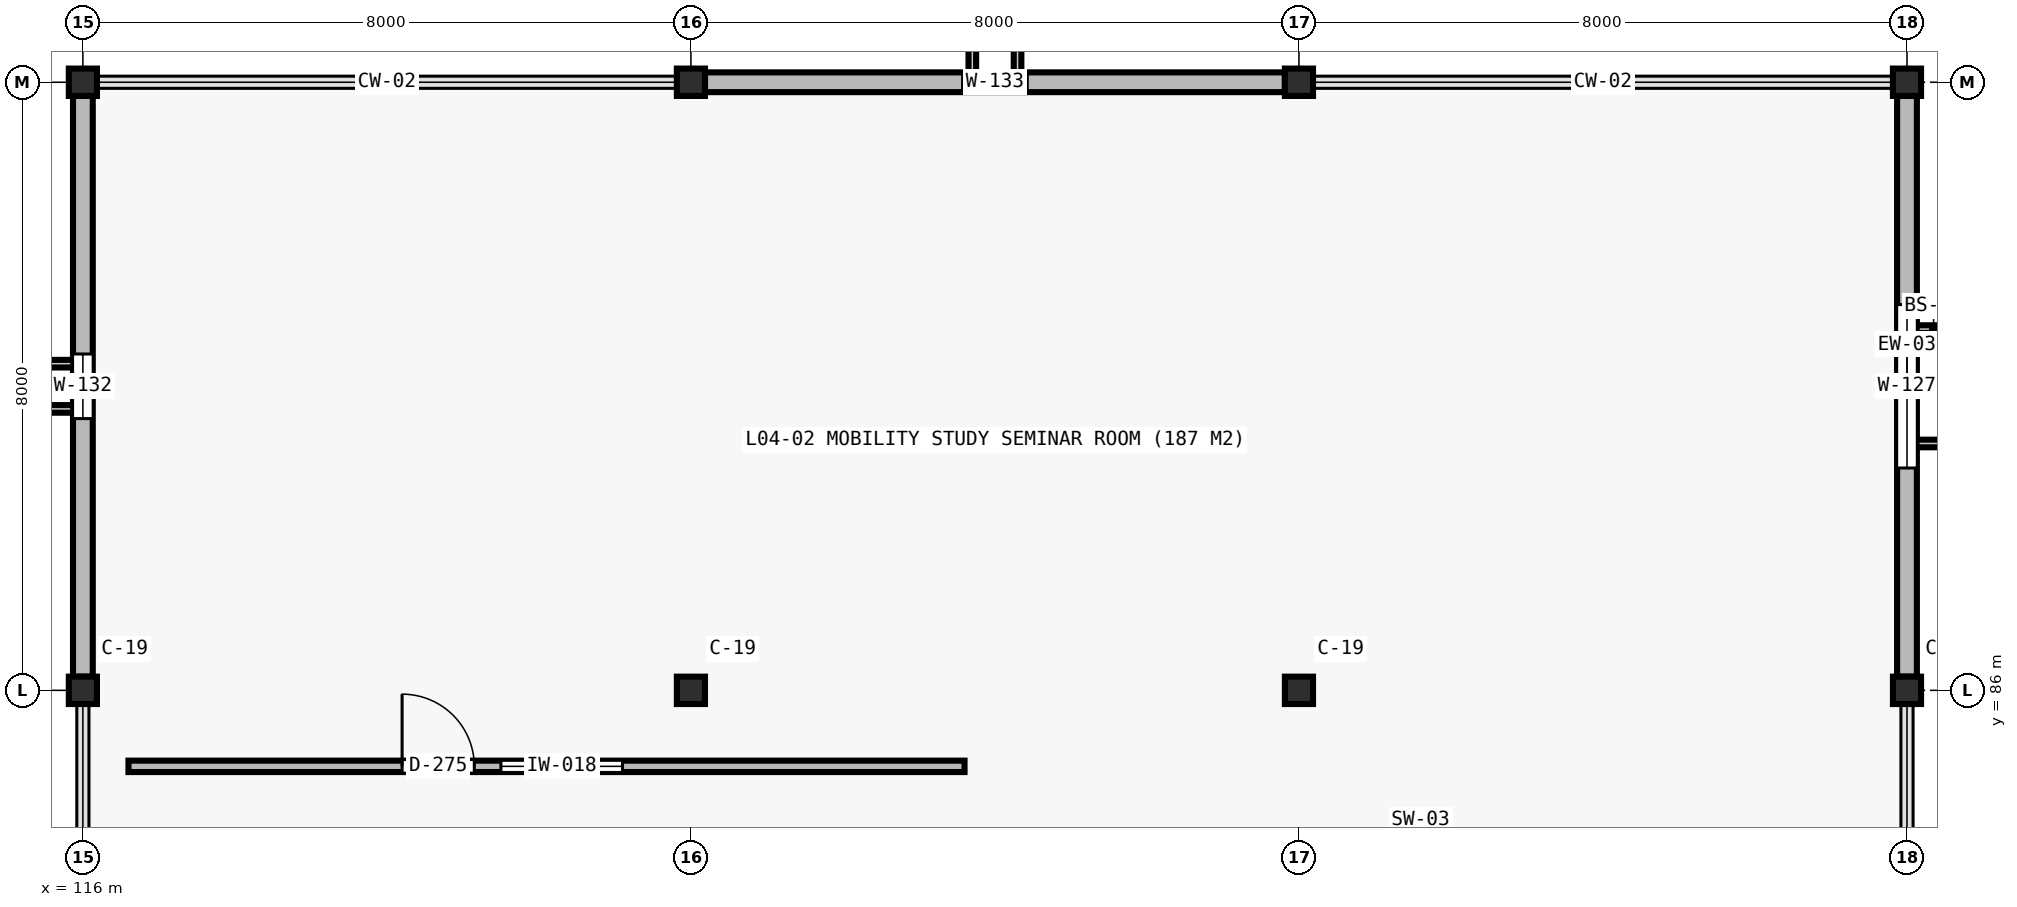
"""IFC4 building model, lengths in metres.
Left out: names, types, materials, properties, quantities, classifications, styles, units other than length and angle.
Written with IfcOpenShell. Run it as: python <this file> out.ifc"""

import sys

from ifc_helpers import new_model, si_unit, direction, frame, frame_2d, origin, origin_2d, place, context, subcontext, project, spatial, rectangle, i_section, extrude, element, fill, save


model = new_model("IFC4")
c1 = context("Model", 3, precision=1e-05, world=origin(), true_north=direction((0.0, 1.0)))
c2 = subcontext(c1, "Body", "Model", "MODEL_VIEW")
j1 = project(units=[si_unit("LENGTHUNIT", "METRE"), si_unit("PLANEANGLEUNIT", "RADIAN")], contexts=[c1])
p1 = place(None, origin())
s1 = spatial("IfcSite", under=j1, at=p1, CompositionType="ELEMENT")
p2 = place(p1, origin())
s2 = spatial("IfcBuilding", under=s1, at=p2, CompositionType="ELEMENT")
p3 = place(p2, frame((0.0, 0.0, 19.6)))
s3 = spatial("IfcBuildingStorey", under=s2, at=p3, CompositionType="ELEMENT", Elevation=19.6)
for number, where, z_axis, x_axis in (
    (1, (116.0, 86.0, 0.0), (0.0, 0.0, 1.0), (1.0, 0.0, 0.0)),
    (2, (116.0, 94.0, 0.0), (0.0, 0.0, 1.0), (1.0, 0.0, 0.0)),
    (3, (124.0, 86.0, 0.0), (0.0, 0.0, 1.0), (1.0, 0.0, 0.0)),
    (4, (124.0, 94.0, 0.0), (0.0, 0.0, 1.0), (1.0, 0.0, 0.0)),
    (5, (132.0, 86.0, 0.0), (0.0, 0.0, 1.0), (1.0, 0.0, 0.0)),
    (6, (132.0, 94.0, 0.0), (0.0, 0.0, 1.0), (1.0, 0.0, 0.0)),
    (7, (140.0, 86.0, 0.0), (0.0, 0.0, 1.0), (1.0, 0.0, 0.0)),
    (8, (140.0, 94.0, 0.0), (0.0, 0.0, 1.0), (1.0, 0.0, 0.0)),
):
    element("IfcColumn", number, at=place(p3, frame(where, z_axis=z_axis, x_axis=x_axis)), inside=s3, PredefinedType="COLUMN", context=c2, shape_type="SweptSolid", body=[
        extrude(i_section(OverallWidth=0.37, OverallDepth=0.36, WebThickness=0.012, FlangeThickness=0.02, at=origin_2d()), origin(), (0.0, 0.0, 1.0), 4.02),
    ])
p4 = place(p3, frame((140.0, 93.82, 0.0), z_axis=(0.0, 0.0, 1.0), x_axis=(0.0, -1.0, 0.0)))
e9 = element("IfcWall", 9, at=p4, inside=s3, PredefinedType="STANDARD", context=c2, shape_type="SweptSolid", body=[
    extrude(rectangle(XDim=7.64, YDim=0.26, at=frame_2d((3.82, 0.0))), origin(), (0.0, 0.0, 1.0), 3.56),
])
p5 = place(p4, frame((2.745, 0.0, 0.95)))
e10 = element("IfcOpeningElement", 10, at=p5, cuts=e9, PredefinedType="OPENING", context=c2, shape_type="SweptSolid", body=[
    extrude(rectangle(XDim=2.15, YDim=1.5, at=frame_2d((1.075, 0.75))), frame((0.0, 0.14, 0.0), z_axis=(0.0, -1.0, 0.0), x_axis=(1.0, 0.0, 0.0)), (0.0, 0.0, 1.0), 0.28),
])
p6 = place(p3, frame((116.0, 86.18, 0.0), z_axis=(0.0, 0.0, 1.0), x_axis=(0.0, 1.0, 0.0)))
e11 = element("IfcWall", 11, at=p6, inside=s3, PredefinedType="STANDARD", context=c2, shape_type="SweptSolid", body=[
    extrude(rectangle(XDim=7.64, YDim=0.26, at=frame_2d((3.82, 0.0))), origin(), (0.0, 0.0, 1.0), 3.56),
])
p7 = place(p6, frame((3.395, 0.0, 0.95)))
e12 = element("IfcOpeningElement", 12, at=p7, cuts=e11, PredefinedType="OPENING", context=c2, shape_type="SweptSolid", body=[
    extrude(rectangle(XDim=0.85, YDim=1.9, at=frame_2d((0.425, 0.95))), frame((0.0, 0.14, 0.0), z_axis=(0.0, -1.0, 0.0), x_axis=(1.0, 0.0, 0.0)), (0.0, 0.0, 1.0), 0.28),
])
p8 = place(p3, frame((124.185, 94.0, 0.0), z_axis=(0.0, 0.0, 1.0), x_axis=(1.0, 0.0, 0.0)))
e13 = element("IfcWall", 13, at=p8, inside=s3, PredefinedType="STANDARD", context=c2, shape_type="SweptSolid", body=[
    extrude(rectangle(XDim=7.63, YDim=0.26, at=frame_2d((3.815, 0.0))), origin(), (0.0, 0.0, 1.0), 3.61),
])
p9 = place(p8, frame((3.39, 0.0, 0.95)))
e14 = element("IfcOpeningElement", 14, at=p9, cuts=e13, PredefinedType="OPENING", context=c2, shape_type="SweptSolid", body=[
    extrude(rectangle(XDim=0.85, YDim=1.9, at=frame_2d((0.425, 0.95))), frame((0.0, 0.14, 0.0), z_axis=(0.0, -1.0, 0.0), x_axis=(1.0, 0.0, 0.0)), (0.0, 0.0, 1.0), 0.28),
])
p10 = place(p3, frame((116.6, 85.0, 0.0), z_axis=(0.0, 0.0, 1.0), x_axis=(1.0, 0.0, 0.0)))
e15 = element("IfcWall", 15, at=p10, inside=s3, PredefinedType="PARTITIONING", context=c2, shape_type="SweptSolid", body=[
    extrude(rectangle(XDim=11.0, YDim=0.15, at=frame_2d((5.5, 0.0))), origin(), (0.0, 0.0, 1.0), 4.02),
])
p11 = place(p10, frame((3.6, 0.0, 0.0)))
e16 = element("IfcOpeningElement", 16, at=p11, cuts=e15, PredefinedType="OPENING", context=c2, shape_type="SweptSolid", body=[
    extrude(rectangle(XDim=0.95, YDim=2.1, at=frame_2d((0.475, 1.05))), frame((0.0, 0.085, 0.0), z_axis=(0.0, -1.0, 0.0), x_axis=(1.0, 0.0, 0.0)), (0.0, 0.0, 1.0), 0.17),
])
p12 = place(p10, frame((4.9, 0.0, 0.95)))
e17 = element("IfcOpeningElement", 17, at=p12, cuts=e15, PredefinedType="OPENING", context=c2, shape_type="SweptSolid", body=[
    extrude(rectangle(XDim=1.6, YDim=1.3, at=frame_2d((0.8, 0.65))), frame((0.0, 0.085, 0.0), z_axis=(0.0, -1.0, 0.0), x_axis=(1.0, 0.0, 0.0)), (0.0, 0.0, 1.0), 0.17),
])
p13 = place(p5, origin())
e18 = element("IfcWindow", 18, at=p13, inside=s3, PartitioningType="SINGLE_PANEL", PredefinedType="WINDOW", context=c2, shape_type="SweptSolid", body=[
    extrude(rectangle(XDim=2.15, YDim=1.5, at=frame_2d((1.075, 0.75))), frame((0.0, 0.03, 0.0), z_axis=(0.0, -1.0, 0.0), x_axis=(1.0, 0.0, 0.0)), (0.0, 0.0, 1.0), 0.06),
])
fill(e10, e18)
p14 = place(p7, origin())
e19 = element("IfcWindow", 19, at=p14, inside=s3, PartitioningType="SINGLE_PANEL", PredefinedType="WINDOW", context=c2, shape_type="SweptSolid", body=[
    extrude(rectangle(XDim=0.85, YDim=1.9, at=frame_2d((0.425, 0.95))), frame((0.0, 0.03, 0.0), z_axis=(0.0, -1.0, 0.0), x_axis=(1.0, 0.0, 0.0)), (0.0, 0.0, 1.0), 0.06),
])
fill(e12, e19)
p15 = place(p9, origin())
e20 = element("IfcWindow", 20, at=p15, inside=s3, PartitioningType="SINGLE_PANEL", PredefinedType="WINDOW", context=c2, shape_type="SweptSolid", body=[
    extrude(rectangle(XDim=0.85, YDim=1.9, at=frame_2d((0.425, 0.95))), frame((0.0, 0.03, 0.0), z_axis=(0.0, -1.0, 0.0), x_axis=(1.0, 0.0, 0.0)), (0.0, 0.0, 1.0), 0.06),
])
fill(e14, e20)
p16 = place(p11, origin())
e21 = element("IfcDoor", 21, at=p16, inside=s3, OperationType="SINGLE_SWING_LEFT", PredefinedType="DOOR", context=c2, shape_type="SweptSolid", body=[
    extrude(rectangle(XDim=0.95, YDim=2.1, at=frame_2d((0.475, 1.05))), frame((0.0, 0.025, 0.0), z_axis=(0.0, -1.0, 0.0), x_axis=(1.0, 0.0, 0.0)), (0.0, 0.0, 1.0), 0.05),
])
fill(e16, e21)
p17 = place(p12, origin())
e22 = element("IfcWindow", 22, at=p17, inside=s3, PartitioningType="SINGLE_PANEL", PredefinedType="WINDOW", context=c2, shape_type="SweptSolid", body=[
    extrude(rectangle(XDim=1.6, YDim=1.3, at=frame_2d((0.8, 0.65))), frame((0.0, 0.03, 0.0), z_axis=(0.0, -1.0, 0.0), x_axis=(1.0, 0.0, 0.0)), (0.0, 0.0, 1.0), 0.06),
])
fill(e17, e22)
save(model, sys.argv[1])
